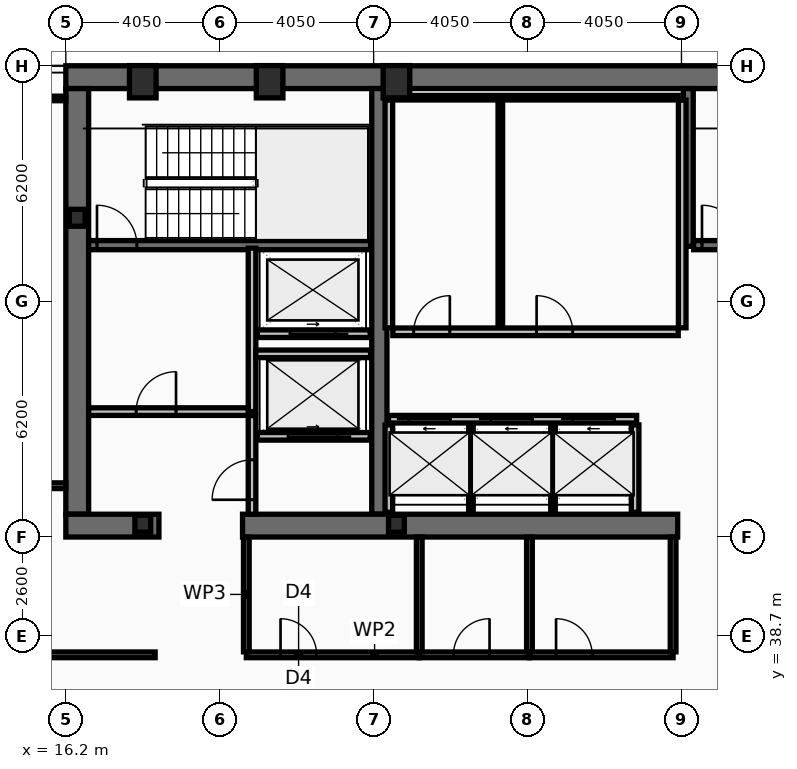
"""IFC4 building model, lengths in metres.
Left out: names, types, materials, properties, quantities, classifications, styles, units other than length and angle.
Written with IfcOpenShell. Run it as: python <this file> out.ifc"""

import sys

from ifc_helpers import new_model, si_unit, direction, frame, frame_2d, origin, origin_2d, place, context, subcontext, project, spatial, rectangle, hollow_rectangle, i_section, extrude, element, fill, save


model = new_model("IFC4")
c1 = context("Model", 3, precision=1e-05, world=origin(), true_north=direction((0.0, 1.0)))
c2 = subcontext(c1, "Body", "Model", "MODEL_VIEW")
j1 = project(units=[si_unit("LENGTHUNIT", "METRE"), si_unit("PLANEANGLEUNIT", "RADIAN")], contexts=[c1])
p1 = place(None, origin())
s1 = spatial("IfcSite", under=j1, at=p1, CompositionType="ELEMENT")
p2 = place(p1, origin())
s2 = spatial("IfcBuilding", under=s1, at=p2, CompositionType="ELEMENT")
p3 = place(p2, frame((0.0, 0.0, 180.6)))
s3 = spatial("IfcBuildingStorey", under=s2, at=p3, CompositionType="ELEMENT", Elevation=180.6)
p4 = place(p3, frame((16.2, 53.4, 0.0), z_axis=(0.0, 0.0, 1.0), x_axis=(1.0, 0.0, 0.0)))
e1 = element("IfcWall", 1, at=p4, inside=s3, PredefinedType="SHEAR", context=c2, shape_type="SweptSolid", body=[
    extrude(rectangle(XDim=40.5, YDim=0.6, at=frame_2d((20.25, 0.0))), origin(), (0.0, 0.0, 1.0), 3.4),
])
p5 = place(p3, frame((16.5, 41.9, 0.0), z_axis=(0.0, 0.0, 1.0), x_axis=(0.0, 1.0, 0.0)))
e2 = element("IfcWall", 2, at=p5, inside=s3, PredefinedType="SHEAR", context=c2, shape_type="SweptSolid", body=[
    extrude(rectangle(XDim=11.2, YDim=0.6, at=frame_2d((5.6, 0.0))), origin(), (0.0, 0.0, 1.0), 3.4),
])
p6 = place(p3, frame((24.45, 41.9, 0.0), z_axis=(0.0, 0.0, 1.0), x_axis=(0.0, 1.0, 0.0)))
e3 = element("IfcWall", 3, at=p6, inside=s3, PredefinedType="SHEAR", context=c2, shape_type="SweptSolid", body=[
    extrude(rectangle(XDim=11.2, YDim=0.4, at=frame_2d((5.6, 0.0))), origin(), (0.0, 0.0, 1.0), 3.4),
])
p7 = place(p3, frame((18.65, 41.6, 0.0), z_axis=(0.0, 0.0, 1.0), x_axis=(-1.0, 0.0, 0.0)))
e4 = element("IfcWall", 4, at=p7, inside=s3, PredefinedType="SHEAR", context=c2, shape_type="SweptSolid", body=[
    extrude(rectangle(XDim=2.45, YDim=0.6, at=frame_2d((1.225, 0.0))), origin(), (0.0, 0.0, 1.0), 3.4),
])
p8 = place(p3, frame((32.3, 41.6, 0.0), z_axis=(0.0, 0.0, 1.0), x_axis=(-1.0, 0.0, 0.0)))
e5 = element("IfcWall", 5, at=p8, inside=s3, PredefinedType="SHEAR", context=c2, shape_type="SweptSolid", body=[
    extrude(rectangle(XDim=11.45, YDim=0.6, at=frame_2d((5.725, 0.0))), origin(), (0.0, 0.0, 1.0), 3.4),
])
p9 = place(p3, frame((32.58, 48.95, 0.0), z_axis=(0.0, 0.0, 1.0), x_axis=(0.0, 1.0, 0.0)))
e6 = element("IfcWall", 6, at=p9, inside=s3, PredefinedType="SHEAR", context=c2, shape_type="SweptSolid", body=[
    extrude(rectangle(XDim=4.15, YDim=0.26, at=frame_2d((2.075, 0.0))), origin(), (0.0, 0.0, 1.0), 3.4),
])
p10 = place(p3, frame((16.8, 48.98, 0.0), z_axis=(0.0, 0.0, 1.0), x_axis=(1.0, 0.0, 0.0)))
e7 = element("IfcWall", 7, at=p10, inside=s3, PredefinedType="SHEAR", context=c2, shape_type="SweptSolid", body=[
    extrude(rectangle(XDim=7.42, YDim=0.24, at=frame_2d((3.71, 0.0))), origin(), (0.0, 0.0, 1.0), 3.4),
])
p11 = place(p10, frame((0.22, 0.0, 0.0)))
e8 = element("IfcOpeningElement", 8, at=p11, cuts=e7, PredefinedType="OPENING", context=c2, shape_type="SweptSolid", body=[
    extrude(rectangle(XDim=1.05, YDim=2.15, at=frame_2d((0.525, 1.075))), frame((0.0, 0.13, 0.0), z_axis=(0.0, -1.0, 0.0), x_axis=(1.0, 0.0, 0.0)), (0.0, 0.0, 1.0), 0.26),
])
p12 = place(p3, frame((32.72, 48.98, 0.0), z_axis=(0.0, 0.0, 1.0), x_axis=(1.0, 0.0, 0.0)))
e9 = element("IfcWall", 9, at=p12, inside=s3, PredefinedType="SHEAR", context=c2, shape_type="SweptSolid", body=[
    extrude(rectangle(XDim=7.56, YDim=0.24, at=frame_2d((3.78, 0.0))), origin(), (0.0, 0.0, 1.0), 3.4),
])
p13 = place(p12, frame((0.22, 0.0, 0.0)))
e10 = element("IfcOpeningElement", 10, at=p13, cuts=e9, PredefinedType="OPENING", context=c2, shape_type="SweptSolid", body=[
    extrude(rectangle(XDim=1.05, YDim=2.15, at=frame_2d((0.525, 1.075))), frame((0.0, 0.13, 0.0), z_axis=(0.0, -1.0, 0.0), x_axis=(1.0, 0.0, 0.0)), (0.0, 0.0, 1.0), 0.26),
])
for number, where, z_axis, x_axis in (
    (11, (18.225, 53.28, 0.0), (0.0, 0.0, 1.0), (1.0, 0.0, 0.0)),
    (12, (21.562, 53.28, 0.0), (0.0, 0.0, 1.0), (1.0, 0.0, 0.0)),
    (13, (24.9, 53.28, 0.0), (0.0, 0.0, 1.0), (1.0, 0.0, 0.0)),
):
    element("IfcColumn", number, at=place(p3, frame(where, z_axis=z_axis, x_axis=x_axis)), inside=s3, PredefinedType="COLUMN", context=c2, shape_type="SweptSolid", body=[
        extrude(hollow_rectangle(XDim=0.7, YDim=0.85, WallThickness=0.05, at=origin_2d()), origin(), (0.0, 0.0, 1.0), 3.6),
    ])
for number, where, z_axis, x_axis in (
    (14, (16.5, 49.7, 0.0), (0.0, 0.0, 1.0), (1.0, 0.0, 0.0)),
    (15, (18.225, 41.65, 0.0), (0.0, 0.0, 1.0), (1.0, 0.0, 0.0)),
    (16, (24.9, 41.65, 0.0), (0.0, 0.0, 1.0), (1.0, 0.0, 0.0)),
):
    element("IfcColumn", number, at=place(p3, frame(where, z_axis=z_axis, x_axis=x_axis)), inside=s3, PredefinedType="COLUMN", context=c2, shape_type="SweptSolid", body=[
        extrude(i_section(OverallWidth=0.416, OverallDepth=0.446, WebThickness=0.039, FlangeThickness=0.063, at=origin_2d()), origin(), (0.0, 0.0, 1.0), 3.6),
    ])
p14 = place(p3, frame((24.69, 44.4, 0.0), z_axis=(0.0, 0.0, 1.0), x_axis=(1.0, 0.0, 0.0)))
e17 = element("IfcWall", 17, at=p14, inside=s3, PredefinedType="PARTITIONING", context=c2, shape_type="SweptSolid", body=[
    extrude(rectangle(XDim=6.53, YDim=0.2, at=frame_2d((3.265, 0.0))), origin(), (0.0, 0.0, 1.0), 3.4),
])
p15 = place(p14, frame((0.53, 0.0, 0.0)))
e18 = element("IfcOpeningElement", 18, at=p15, cuts=e17, PredefinedType="OPENING", context=c2, shape_type="SweptSolid", body=[
    extrude(rectangle(XDim=1.1, YDim=2.18, at=frame_2d((0.55, 1.09))), frame((0.0, 0.11, 0.0), z_axis=(0.0, -1.0, 0.0), x_axis=(1.0, 0.0, 0.0)), (0.0, 0.0, 1.0), 0.22),
])
p16 = place(p14, frame((2.69, 0.0, 0.0)))
e19 = element("IfcOpeningElement", 19, at=p16, cuts=e17, PredefinedType="OPENING", context=c2, shape_type="SweptSolid", body=[
    extrude(rectangle(XDim=1.1, YDim=2.18, at=frame_2d((0.55, 1.09))), frame((0.0, 0.11, 0.0), z_axis=(0.0, -1.0, 0.0), x_axis=(1.0, 0.0, 0.0)), (0.0, 0.0, 1.0), 0.22),
])
p17 = place(p14, frame((4.85, 0.0, 0.0)))
e20 = element("IfcOpeningElement", 20, at=p17, cuts=e17, PredefinedType="OPENING", context=c2, shape_type="SweptSolid", body=[
    extrude(rectangle(XDim=1.1, YDim=2.18, at=frame_2d((0.55, 1.09))), frame((0.0, 0.11, 0.0), z_axis=(0.0, -1.0, 0.0), x_axis=(1.0, 0.0, 0.0)), (0.0, 0.0, 1.0), 0.22),
])
p18 = place(p3, frame((24.21, 43.95, 0.0), z_axis=(0.0, 0.0, 1.0), x_axis=(-1.0, 0.0, 0.0)))
e21 = element("IfcWall", 21, at=p18, inside=s3, PredefinedType="PARTITIONING", context=c2, shape_type="SweptSolid", body=[
    extrude(rectangle(XDim=2.97, YDim=0.2, at=frame_2d((1.485, 0.0))), origin(), (0.0, 0.0, 1.0), 3.4),
])
p19 = place(p18, frame((0.86, 0.0, 0.0)))
e22 = element("IfcOpeningElement", 22, at=p19, cuts=e21, PredefinedType="OPENING", context=c2, shape_type="SweptSolid", body=[
    extrude(rectangle(XDim=1.3, YDim=2.18, at=frame_2d((0.65, 1.09))), frame((0.0, 0.11, 0.0), z_axis=(0.0, -1.0, 0.0), x_axis=(1.0, 0.0, 0.0)), (0.0, 0.0, 1.0), 0.22),
])
p20 = place(p3, frame((24.21, 46.65, 0.0), z_axis=(0.0, 0.0, 1.0), x_axis=(-1.0, 0.0, 0.0)))
e23 = element("IfcWall", 23, at=p20, inside=s3, PredefinedType="PARTITIONING", context=c2, shape_type="SweptSolid", body=[
    extrude(rectangle(XDim=2.97, YDim=0.2, at=frame_2d((1.485, 0.0))), origin(), (0.0, 0.0, 1.0), 3.4),
])
p21 = place(p20, frame((0.91, 0.0, 0.0)))
e24 = element("IfcOpeningElement", 24, at=p21, cuts=e23, PredefinedType="OPENING", context=c2, shape_type="SweptSolid", body=[
    extrude(rectangle(XDim=1.2, YDim=2.18, at=frame_2d((0.6, 1.09))), frame((0.0, 0.11, 0.0), z_axis=(0.0, -1.0, 0.0), x_axis=(1.0, 0.0, 0.0)), (0.0, 0.0, 1.0), 0.22),
])
p22 = place(p3, frame((21.1, 44.6, 0.0), z_axis=(0.0, 0.0, 1.0), x_axis=(0.0, 1.0, 0.0)))
e25 = element("IfcWall", 25, at=p22, inside=s3, PredefinedType="PARTITIONING", context=c2, shape_type="SweptSolid", body=[
    extrude(rectangle(XDim=4.3, YDim=0.2, at=frame_2d((2.15, 0.0))), origin(), (0.0, 0.0, 1.0), 3.4),
])
p23 = place(p3, frame((16.8, 44.6, 0.0), z_axis=(0.0, 0.0, 1.0), x_axis=(1.0, 0.0, 0.0)))
e26 = element("IfcWall", 26, at=p23, inside=s3, PredefinedType="PARTITIONING", context=c2, shape_type="SweptSolid", body=[
    extrude(rectangle(XDim=4.2, YDim=0.2, at=frame_2d((2.1, 0.0))), origin(), (0.0, 0.0, 1.0), 3.4),
])
p24 = place(p23, frame((1.25, 0.0, 0.0)))
e27 = element("IfcOpeningElement", 27, at=p24, cuts=e26, PredefinedType="OPENING", context=c2, shape_type="SweptSolid", body=[
    extrude(rectangle(XDim=1.05, YDim=2.15, at=frame_2d((0.525, 1.075))), frame((0.0, 0.11, 0.0), z_axis=(0.0, -1.0, 0.0), x_axis=(1.0, 0.0, 0.0)), (0.0, 0.0, 1.0), 0.22),
])
p25 = place(p3, frame((21.2, 46.12, 0.0), z_axis=(0.0, 0.0, 1.0), x_axis=(1.0, 0.0, 0.0)))
e28 = element("IfcWall", 28, at=p25, inside=s3, PredefinedType="PARTITIONING", context=c2, shape_type="SweptSolid", body=[
    extrude(rectangle(XDim=3.02, YDim=0.2, at=frame_2d((1.51, 0.0))), origin(), (0.0, 0.0, 1.0), 3.4),
])
p26 = place(p3, frame((21.1, 41.9, 0.0), z_axis=(0.0, 0.0, 1.0), x_axis=(0.0, 1.0, 0.0)))
e29 = element("IfcWall", 29, at=p26, inside=s3, PredefinedType="PARTITIONING", context=c2, shape_type="SweptSolid", body=[
    extrude(rectangle(XDim=2.595, YDim=0.2, at=frame_2d((1.298, 0.0))), origin(), (0.0, 0.0, 1.0), 3.4),
])
p27 = place(p26, frame((0.38, 0.0, 0.0)))
e30 = element("IfcOpeningElement", 30, at=p27, cuts=e29, PredefinedType="OPENING", context=c2, shape_type="SweptSolid", body=[
    extrude(rectangle(XDim=1.05, YDim=2.15, at=frame_2d((0.525, 1.075))), frame((0.0, 0.11, 0.0), z_axis=(0.0, -1.0, 0.0), x_axis=(1.0, 0.0, 0.0)), (0.0, 0.0, 1.0), 0.22),
])
for number, where, z_axis, x_axis in (
    (31, (24.7, 46.805, 0.0), (0.0, 0.0, 1.0), (0.0, 1.0, 0.0)),
    (32, (32.42, 46.805, 0.0), (0.0, 0.0, 1.0), (0.0, 1.0, 0.0)),
):
    element("IfcWall", number, at=place(p3, frame(where, z_axis=z_axis, x_axis=x_axis)), inside=s3, PredefinedType="PARTITIONING", context=c2, shape_type="SweptSolid", body=[
        extrude(rectangle(XDim=5.99, YDim=0.2, at=frame_2d((2.995, 0.0))), origin(), (0.0, 0.0, 1.0), 3.4),
    ])
p28 = place(p3, frame((24.805, 52.86, 0.0), z_axis=(0.0, 0.0, 1.0), x_axis=(1.0, 0.0, 0.0)))
e33 = element("IfcWall", 33, at=p28, inside=s3, PredefinedType="PARTITIONING", context=c2, shape_type="SweptSolid", body=[
    extrude(rectangle(XDim=7.51, YDim=0.12, at=frame_2d((3.755, 0.0))), origin(), (0.0, 0.0, 1.0), 3.4),
])
p29 = place(p3, frame((27.634, 46.805, 0.0), z_axis=(0.0, 0.0, 1.0), x_axis=(0.0, 1.0, 0.0)))
e34 = element("IfcWall", 34, at=p29, inside=s3, PredefinedType="PARTITIONING", context=c2, shape_type="SweptSolid", body=[
    extrude(rectangle(XDim=5.99, YDim=0.12, at=frame_2d((2.995, 0.0))), origin(), (0.0, 0.0, 1.0), 3.4),
])
p30 = place(p3, frame((24.805, 46.7, 0.0), z_axis=(0.0, 0.0, 1.0), x_axis=(1.0, 0.0, 0.0)))
e35 = element("IfcWall", 35, at=p30, inside=s3, PredefinedType="PARTITIONING", context=c2, shape_type="SweptSolid", body=[
    extrude(rectangle(XDim=7.51, YDim=0.2, at=frame_2d((3.755, 0.0))), origin(), (0.0, 0.0, 1.0), 3.4),
])
p31 = place(p30, frame((0.55, 0.0, 0.0)))
e36 = element("IfcOpeningElement", 36, at=p31, cuts=e35, PredefinedType="OPENING", context=c2, shape_type="SweptSolid", body=[
    extrude(rectangle(XDim=0.95, YDim=2.1, at=frame_2d((0.475, 1.05))), frame((0.0, 0.11, 0.0), z_axis=(0.0, -1.0, 0.0), x_axis=(1.0, 0.0, 0.0)), (0.0, 0.0, 1.0), 0.22),
])
p32 = place(p30, frame((3.784, 0.0, 0.0)))
e37 = element("IfcOpeningElement", 37, at=p32, cuts=e35, PredefinedType="OPENING", context=c2, shape_type="SweptSolid", body=[
    extrude(rectangle(XDim=0.95, YDim=2.1, at=frame_2d((0.475, 1.05))), frame((0.0, 0.11, 0.0), z_axis=(0.0, -1.0, 0.0), x_axis=(1.0, 0.0, 0.0)), (0.0, 0.0, 1.0), 0.22),
])
for number, where, z_axis, x_axis in (
    (38, (24.7, 41.95, 0.0), (0.0, 0.0, 1.0), (0.0, 1.0, 0.0)),
    (39, (31.18, 41.95, 0.0), (0.0, 0.0, 1.0), (0.0, 1.0, 0.0)),
):
    element("IfcWall", number, at=place(p3, frame(where, z_axis=z_axis, x_axis=x_axis)), inside=s3, PredefinedType="PARTITIONING", context=c2, shape_type="SweptSolid", body=[
        extrude(rectangle(XDim=2.3, YDim=0.2, at=frame_2d((1.15, 0.0))), origin(), (0.0, 0.0, 1.0), 3.4),
    ])
for number, where, z_axis, x_axis in (
    (40, (26.86, 41.95, 0.0), (0.0, 0.0, 1.0), (0.0, 1.0, 0.0)),
    (41, (29.02, 41.95, 0.0), (0.0, 0.0, 1.0), (0.0, 1.0, 0.0)),
):
    element("IfcWall", number, at=place(p3, frame(where, z_axis=z_axis, x_axis=x_axis)), inside=s3, PredefinedType="PARTITIONING", context=c2, shape_type="SweptSolid", body=[
        extrude(rectangle(XDim=2.3, YDim=0.12, at=frame_2d((1.15, 0.0))), origin(), (0.0, 0.0, 1.0), 3.4),
    ])
p33 = place(p3, frame((20.95, 38.2, 0.0), z_axis=(0.0, 0.0, 1.0), x_axis=(1.0, 0.0, 0.0)))
e42 = element("IfcWall", 42, at=p33, inside=s3, PredefinedType="PARTITIONING", context=c2, shape_type="SweptSolid", body=[
    extrude(rectangle(XDim=4.55, YDim=0.15, at=frame_2d((2.275, 0.0))), origin(), (0.0, 0.0, 1.0), 2.69),
])
p34 = place(p33, frame((0.9, 0.0, 0.0)))
e43 = element("IfcOpeningElement", 43, at=p34, cuts=e42, PredefinedType="OPENING", context=c2, shape_type="SweptSolid", body=[
    extrude(rectangle(XDim=0.95, YDim=2.05, at=frame_2d((0.475, 1.025))), frame((0.0, 0.085, 0.0), z_axis=(0.0, -1.0, 0.0), x_axis=(1.0, 0.0, 0.0)), (0.0, 0.0, 1.0), 0.17),
])
p35 = place(p3, frame((25.5, 38.2, 0.0), z_axis=(0.0, 0.0, 1.0), x_axis=(1.0, 0.0, 0.0)))
e44 = element("IfcWall", 44, at=p35, inside=s3, PredefinedType="PARTITIONING", context=c2, shape_type="SweptSolid", body=[
    extrude(rectangle(XDim=2.9, YDim=0.15, at=frame_2d((1.45, 0.0))), origin(), (0.0, 0.0, 1.0), 3.4),
])
p36 = place(p35, frame((0.9, 0.0, 0.0)))
e45 = element("IfcOpeningElement", 45, at=p36, cuts=e44, PredefinedType="OPENING", context=c2, shape_type="SweptSolid", body=[
    extrude(rectangle(XDim=0.95, YDim=2.05, at=frame_2d((0.475, 1.025))), frame((0.0, 0.085, 0.0), z_axis=(0.0, -1.0, 0.0), x_axis=(1.0, 0.0, 0.0)), (0.0, 0.0, 1.0), 0.17),
])
p37 = place(p3, frame((28.4, 38.2, 0.0), z_axis=(0.0, 0.0, 1.0), x_axis=(1.0, 0.0, 0.0)))
e46 = element("IfcWall", 46, at=p37, inside=s3, PredefinedType="PARTITIONING", context=c2, shape_type="SweptSolid", body=[
    extrude(rectangle(XDim=3.78, YDim=0.15, at=frame_2d((1.89, 0.0))), origin(), (0.0, 0.0, 1.0), 2.69),
])
p38 = place(p37, frame((0.7, 0.0, 0.0)))
e47 = element("IfcOpeningElement", 47, at=p38, cuts=e46, PredefinedType="OPENING", context=c2, shape_type="SweptSolid", body=[
    extrude(rectangle(XDim=0.95, YDim=2.05, at=frame_2d((0.475, 1.025))), frame((0.0, 0.085, 0.0), z_axis=(0.0, -1.0, 0.0), x_axis=(1.0, 0.0, 0.0)), (0.0, 0.0, 1.0), 0.17),
])
for number, where, z_axis, x_axis in (
    (48, (20.95, 38.28, 0.0), (0.0, 0.0, 1.0), (0.0, 1.0, 0.0)),
    (49, (25.5, 38.28, 0.0), (0.0, 0.0, 1.0), (0.0, 1.0, 0.0)),
    (50, (28.4, 38.28, 0.0), (0.0, 0.0, 1.0), (0.0, 1.0, 0.0)),
    (51, (32.18, 38.28, 0.0), (0.0, 0.0, 1.0), (0.0, 1.0, 0.0)),
):
    element("IfcWall", number, at=place(p3, frame(where, z_axis=z_axis, x_axis=x_axis)), inside=s3, PredefinedType="PARTITIONING", context=c2, shape_type="SweptSolid", body=[
        extrude(rectangle(XDim=3.02, YDim=0.15, at=frame_2d((1.51, 0.0))), origin(), (0.0, 0.0, 1.0), 3.4),
    ])
p39 = place(p3, frame((6.03, 38.2, 0.0), z_axis=(0.0, 0.0, 1.0), x_axis=(1.0, 0.0, 0.0)))
e52 = element("IfcWall", 52, at=p39, inside=s3, PredefinedType="PARTITIONING", context=c2, shape_type="SweptSolid", body=[
    extrude(rectangle(XDim=12.52, YDim=0.15, at=frame_2d((6.26, 0.0))), origin(), (0.0, 0.0, 1.0), 2.69),
])
p40 = place(p39, frame((8.32, 0.0, 0.0)))
e53 = element("IfcOpeningElement", 53, at=p40, cuts=e52, PredefinedType="OPENING", context=c2, shape_type="SweptSolid", body=[
    extrude(rectangle(XDim=0.95, YDim=2.05, at=frame_2d((0.475, 1.025))), frame((0.0, 0.085, 0.0), z_axis=(0.0, -1.0, 0.0), x_axis=(1.0, 0.0, 0.0)), (0.0, 0.0, 1.0), 0.17),
])
p41 = place(p3, frame((6.095, 42.65, 0.0), z_axis=(0.0, 0.0, 1.0), x_axis=(1.0, 0.0, 0.0)))
e54 = element("IfcWall", 54, at=p41, inside=s3, PredefinedType="PARTITIONING", context=c2, shape_type="SweptSolid", body=[
    extrude(rectangle(XDim=10.105, YDim=0.15, at=frame_2d((5.052, 0.0))), origin(), (0.0, 0.0, 1.0), 2.69),
])
p42 = place(p41, frame((8.32, 0.0, 0.0)))
e55 = element("IfcOpeningElement", 55, at=p42, cuts=e54, PredefinedType="OPENING", context=c2, shape_type="SweptSolid", body=[
    extrude(rectangle(XDim=0.9, YDim=2.05, at=frame_2d((0.45, 1.025))), frame((0.0, 0.085, 0.0), z_axis=(0.0, -1.0, 0.0), x_axis=(1.0, 0.0, 0.0)), (0.0, 0.0, 1.0), 0.17),
])
p43 = place(p3, frame((6.095, 52.84, 0.0), z_axis=(0.0, 0.0, 1.0), x_axis=(1.0, 0.0, 0.0)))
e56 = element("IfcWall", 56, at=p43, inside=s3, PredefinedType="PARTITIONING", context=c2, shape_type="SweptSolid", body=[
    extrude(rectangle(XDim=10.105, YDim=0.12, at=frame_2d((5.052, 0.0))), origin(), (0.0, 0.0, 1.0), 3.4),
])
p44 = place(p11, origin())
e57 = element("IfcDoor", 57, at=p44, inside=s3, OperationType="SINGLE_SWING_LEFT", PredefinedType="DOOR", context=c2, shape_type="SweptSolid", body=[
    extrude(rectangle(XDim=1.05, YDim=2.15, at=frame_2d((0.525, 1.075))), frame((0.0, 0.025, 0.0), z_axis=(0.0, -1.0, 0.0), x_axis=(1.0, 0.0, 0.0)), (0.0, 0.0, 1.0), 0.05),
])
fill(e8, e57)
p45 = place(p13, origin())
e58 = element("IfcDoor", 58, at=p45, inside=s3, OperationType="SINGLE_SWING_LEFT", PredefinedType="DOOR", context=c2, shape_type="SweptSolid", body=[
    extrude(rectangle(XDim=1.05, YDim=2.15, at=frame_2d((0.525, 1.075))), frame((0.0, 0.025, 0.0), z_axis=(0.0, -1.0, 0.0), x_axis=(1.0, 0.0, 0.0)), (0.0, 0.0, 1.0), 0.05),
])
fill(e10, e58)
p46 = place(p15, origin())
e59 = element("IfcDoor", 59, at=p46, inside=s3, OperationType="SLIDING_TO_LEFT", PredefinedType="DOOR", context=c2, shape_type="SweptSolid", body=[
    extrude(rectangle(XDim=1.1, YDim=2.18, at=frame_2d((0.55, 1.09))), frame((0.0, 0.025, 0.0), z_axis=(0.0, -1.0, 0.0), x_axis=(1.0, 0.0, 0.0)), (0.0, 0.0, 1.0), 0.05),
])
fill(e18, e59)
p47 = place(p16, origin())
e60 = element("IfcDoor", 60, at=p47, inside=s3, OperationType="SLIDING_TO_LEFT", PredefinedType="DOOR", context=c2, shape_type="SweptSolid", body=[
    extrude(rectangle(XDim=1.1, YDim=2.18, at=frame_2d((0.55, 1.09))), frame((0.0, 0.025, 0.0), z_axis=(0.0, -1.0, 0.0), x_axis=(1.0, 0.0, 0.0)), (0.0, 0.0, 1.0), 0.05),
])
fill(e19, e60)
p48 = place(p17, origin())
e61 = element("IfcDoor", 61, at=p48, inside=s3, OperationType="SLIDING_TO_LEFT", PredefinedType="DOOR", context=c2, shape_type="SweptSolid", body=[
    extrude(rectangle(XDim=1.1, YDim=2.18, at=frame_2d((0.55, 1.09))), frame((0.0, 0.025, 0.0), z_axis=(0.0, -1.0, 0.0), x_axis=(1.0, 0.0, 0.0)), (0.0, 0.0, 1.0), 0.05),
])
fill(e20, e61)
p49 = place(p19, origin())
e62 = element("IfcDoor", 62, at=p49, inside=s3, OperationType="SLIDING_TO_LEFT", PredefinedType="DOOR", context=c2, shape_type="SweptSolid", body=[
    extrude(rectangle(XDim=1.3, YDim=2.18, at=frame_2d((0.65, 1.09))), frame((0.0, 0.025, 0.0), z_axis=(0.0, -1.0, 0.0), x_axis=(1.0, 0.0, 0.0)), (0.0, 0.0, 1.0), 0.05),
])
fill(e22, e62)
p50 = place(p21, origin())
e63 = element("IfcDoor", 63, at=p50, inside=s3, OperationType="SLIDING_TO_LEFT", PredefinedType="DOOR", context=c2, shape_type="SweptSolid", body=[
    extrude(rectangle(XDim=1.2, YDim=2.18, at=frame_2d((0.6, 1.09))), frame((0.0, 0.025, 0.0), z_axis=(0.0, -1.0, 0.0), x_axis=(1.0, 0.0, 0.0)), (0.0, 0.0, 1.0), 0.05),
])
fill(e24, e63)
p51 = place(p24, origin())
e64 = element("IfcDoor", 64, at=p51, inside=s3, OperationType="SINGLE_SWING_RIGHT", PredefinedType="DOOR", context=c2, shape_type="SweptSolid", body=[
    extrude(rectangle(XDim=1.05, YDim=2.15, at=frame_2d((0.525, 1.075))), frame((0.0, 0.025, 0.0), z_axis=(0.0, -1.0, 0.0), x_axis=(1.0, 0.0, 0.0)), (0.0, 0.0, 1.0), 0.05),
])
fill(e27, e64)
p52 = place(p27, origin())
e65 = element("IfcDoor", 65, at=p52, inside=s3, OperationType="SINGLE_SWING_LEFT", PredefinedType="DOOR", context=c2, shape_type="SweptSolid", body=[
    extrude(rectangle(XDim=1.05, YDim=2.15, at=frame_2d((0.525, 1.075))), frame((0.0, 0.025, 0.0), z_axis=(0.0, -1.0, 0.0), x_axis=(1.0, 0.0, 0.0)), (0.0, 0.0, 1.0), 0.05),
])
fill(e30, e65)
p53 = place(p31, origin())
e66 = element("IfcDoor", 66, at=p53, inside=s3, OperationType="SINGLE_SWING_RIGHT", PredefinedType="DOOR", context=c2, shape_type="SweptSolid", body=[
    extrude(rectangle(XDim=0.95, YDim=2.1, at=frame_2d((0.475, 1.05))), frame((0.0, 0.025, 0.0), z_axis=(0.0, -1.0, 0.0), x_axis=(1.0, 0.0, 0.0)), (0.0, 0.0, 1.0), 0.05),
])
fill(e36, e66)
p54 = place(p32, origin())
e67 = element("IfcDoor", 67, at=p54, inside=s3, OperationType="SINGLE_SWING_LEFT", PredefinedType="DOOR", context=c2, shape_type="SweptSolid", body=[
    extrude(rectangle(XDim=0.95, YDim=2.1, at=frame_2d((0.475, 1.05))), frame((0.0, 0.025, 0.0), z_axis=(0.0, -1.0, 0.0), x_axis=(1.0, 0.0, 0.0)), (0.0, 0.0, 1.0), 0.05),
])
fill(e37, e67)
p55 = place(p34, origin())
e68 = element("IfcDoor", 68, at=p55, inside=s3, OperationType="SINGLE_SWING_LEFT", PredefinedType="DOOR", context=c2, shape_type="SweptSolid", body=[
    extrude(rectangle(XDim=0.95, YDim=2.05, at=frame_2d((0.475, 1.025))), frame((0.0, 0.025, 0.0), z_axis=(0.0, -1.0, 0.0), x_axis=(1.0, 0.0, 0.0)), (0.0, 0.0, 1.0), 0.05),
])
fill(e43, e68)
p56 = place(p36, origin())
e69 = element("IfcDoor", 69, at=p56, inside=s3, OperationType="SINGLE_SWING_RIGHT", PredefinedType="DOOR", context=c2, shape_type="SweptSolid", body=[
    extrude(rectangle(XDim=0.95, YDim=2.05, at=frame_2d((0.475, 1.025))), frame((0.0, 0.025, 0.0), z_axis=(0.0, -1.0, 0.0), x_axis=(1.0, 0.0, 0.0)), (0.0, 0.0, 1.0), 0.05),
])
fill(e45, e69)
p57 = place(p38, origin())
e70 = element("IfcDoor", 70, at=p57, inside=s3, OperationType="SINGLE_SWING_LEFT", PredefinedType="DOOR", context=c2, shape_type="SweptSolid", body=[
    extrude(rectangle(XDim=0.95, YDim=2.05, at=frame_2d((0.475, 1.025))), frame((0.0, 0.025, 0.0), z_axis=(0.0, -1.0, 0.0), x_axis=(1.0, 0.0, 0.0)), (0.0, 0.0, 1.0), 0.05),
])
fill(e47, e70)
save(model, sys.argv[1])
